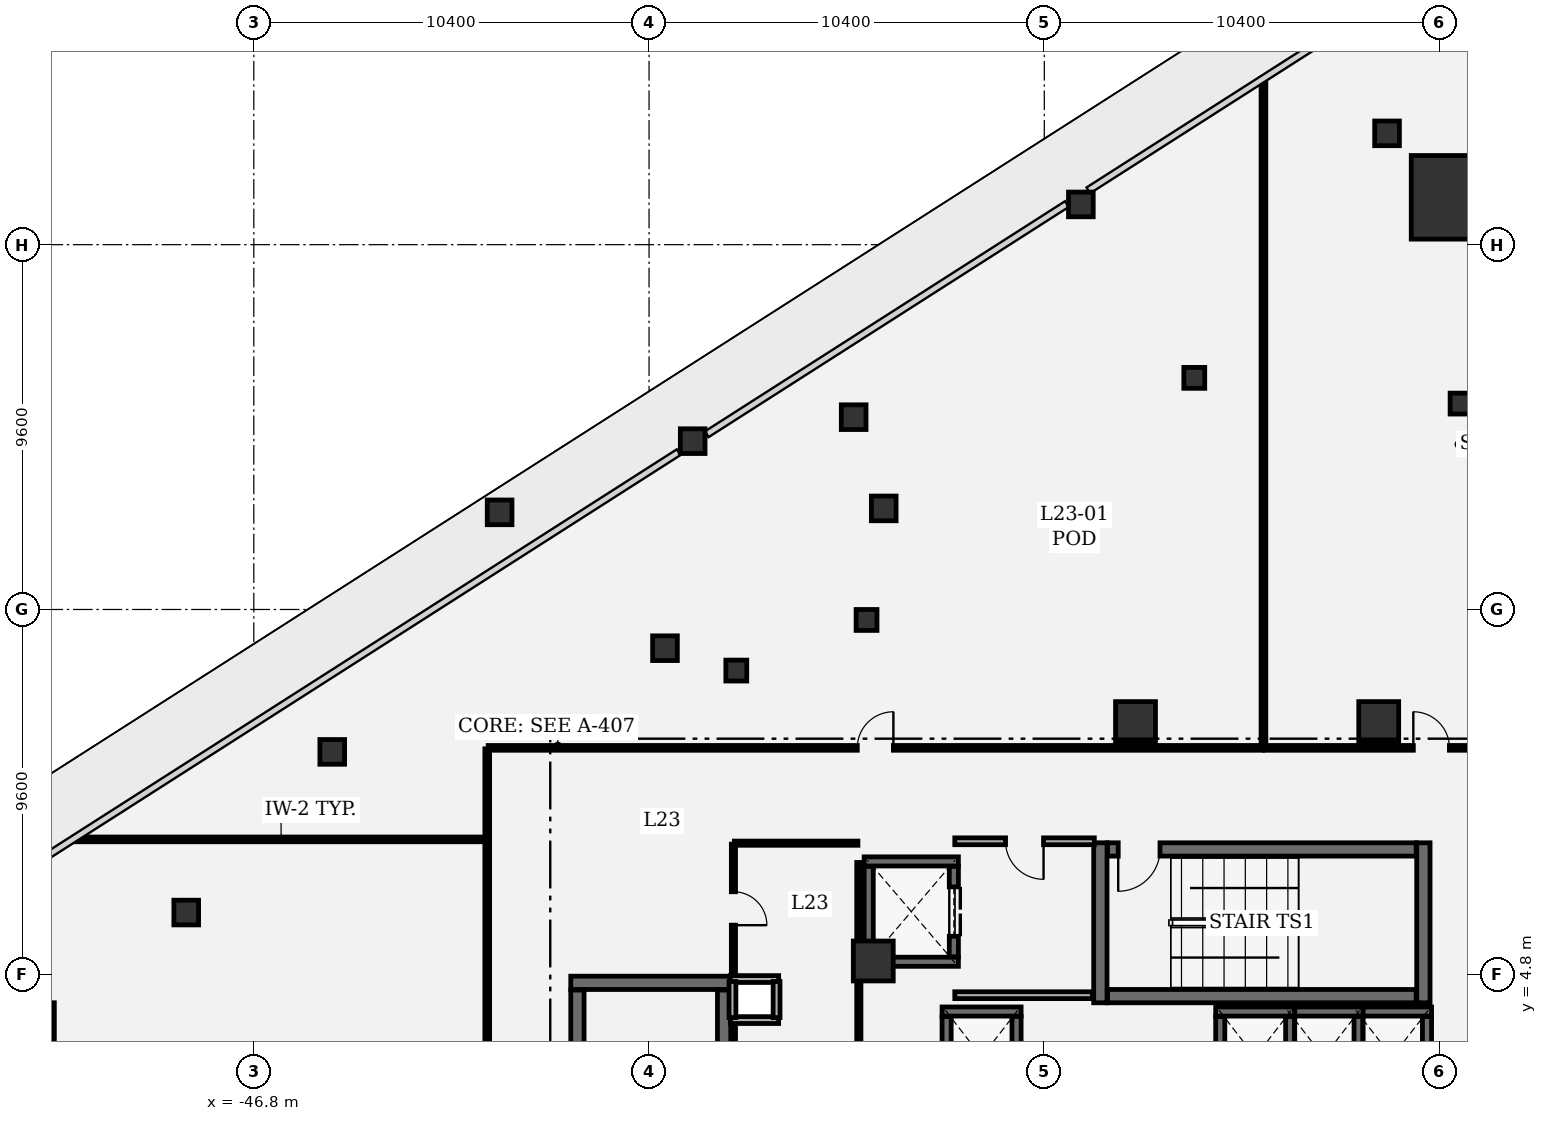
"""IFC4 building model, lengths in metres.
Left out: names, types, materials, properties, quantities, classifications, styles, units other than length and angle.
Written with IfcOpenShell. Run it as: python <this file> out.ifc"""

import sys

from ifc_helpers import new_model, si_unit, direction, frame, frame_2d, origin, origin_2d, place, context, subcontext, project, spatial, rectangle, extrude, element, fill, save


model = new_model("IFC4")
c1 = context("Model", 3, precision=1e-05, world=origin(), true_north=direction((0.0, 1.0)))
c2 = subcontext(c1, "Body", "Model", "MODEL_VIEW")
j1 = project(units=[si_unit("LENGTHUNIT", "METRE"), si_unit("PLANEANGLEUNIT", "RADIAN")], contexts=[c1])
p1 = place(None, origin())
s1 = spatial("IfcSite", under=j1, at=p1, CompositionType="ELEMENT")
p2 = place(p1, origin())
s2 = spatial("IfcBuilding", under=s1, at=p2, CompositionType="ELEMENT")
p3 = place(p2, frame((0.0, 0.0, 105.0)))
s3 = spatial("IfcBuildingStorey", under=s2, at=p3, CompositionType="ELEMENT", Elevation=105.0)
for number, where, z_axis, x_axis in (
    (1, (-53.049, 2.951, 0.0), (0.0, 0.0, 1.0), (1.0, 0.0, 0.0)),
    (2, (-15.344, 25.246, 0.0), (0.0, 0.0, 1.0), (1.0, 0.0, 0.0)),
):
    element("IfcColumn", number, at=place(p3, frame(where, z_axis=z_axis, x_axis=x_axis)), inside=s3, PredefinedType="COLUMN", context=c2, shape_type="SweptSolid", body=[
        extrude(rectangle(XDim=2.0, YDim=2.2, at=origin_2d()), origin(), (0.0, 0.0, 1.0), 4.8),
    ])
for number, where, z_axis, x_axis in (
    (3, (-23.6, 11.45, 0.0), (0.0, 0.0, 1.0), (1.0, 0.0, 0.0)),
    (4, (-17.2, 11.45, 0.0), (0.0, 0.0, 1.0), (1.0, 0.0, 0.0)),
    (5, (-30.5, 5.15, 0.0), (0.0, 0.0, 1.0), (1.0, 0.0, 0.0)),
):
    element("IfcColumn", number, at=place(p3, frame(where, z_axis=z_axis, x_axis=x_axis)), inside=s3, PredefinedType="COLUMN", context=c2, shape_type="SweptSolid", body=[
        extrude(rectangle(XDim=1.05, YDim=1.05, at=origin_2d()), origin(), (0.0, 0.0, 1.0), 4.8),
    ])
for number, where, z_axis, x_axis in (
    (6, (-40.333, 16.956, 0.0), (0.0, 0.0, 1.0), (1.0, 0.0, 0.0)),
    (7, (-35.252, 18.829, 0.0), (0.0, 0.0, 1.0), (1.0, 0.0, 0.0)),
    (8, (-25.038, 25.059, 0.0), (0.0, 0.0, 1.0), (1.0, 0.0, 0.0)),
    (9, (-31.016, 19.46, 0.0), (0.0, 0.0, 1.0), (1.0, 0.0, 0.0)),
    (10, (-44.736, 10.652, 0.0), (0.0, 0.0, 1.0), (1.0, 0.0, 0.0)),
    (11, (-48.578, 6.425, 0.0), (0.0, 0.0, 1.0), (1.0, 0.0, 0.0)),
    (12, (-16.981, 26.929, 0.0), (0.0, 0.0, 1.0), (1.0, 0.0, 0.0)),
    (13, (-35.981, 13.381, 0.0), (0.0, 0.0, 1.0), (1.0, 0.0, 0.0)),
    (14, (-30.225, 17.06, 0.0), (0.0, 0.0, 1.0), (1.0, 0.0, 0.0)),
):
    element("IfcColumn", number, at=place(p3, frame(where, z_axis=z_axis, x_axis=x_axis)), inside=s3, PredefinedType="COLUMN", context=c2, shape_type="SweptSolid", body=[
        extrude(rectangle(XDim=0.65, YDim=0.65, at=origin_2d()), origin(), (0.0, 0.0, 1.0), 4.8),
    ])
for number, where, z_axis, x_axis in (
    (15, (-34.104, 12.792, 0.0), (0.0, 0.0, 1.0), (1.0, 0.0, 0.0)),
    (16, (-22.053, 20.495, 0.0), (0.0, 0.0, 1.0), (1.0, 0.0, 0.0)),
    (17, (-30.677, 14.124, 0.0), (0.0, 0.0, 1.0), (1.0, 0.0, 0.0)),
    (18, (-15.046, 19.818, 0.0), (0.0, 0.0, 1.0), (1.0, 0.0, 0.0)),
):
    element("IfcColumn", number, at=place(p3, frame(where, z_axis=z_axis, x_axis=x_axis)), inside=s3, PredefinedType="COLUMN", context=c2, shape_type="SweptSolid", body=[
        extrude(rectangle(XDim=0.55, YDim=0.55, at=origin_2d()), origin(), (0.0, 0.0, 1.0), 4.8),
    ])
for number, where, z_axis, x_axis in (
    (19, (-24.525, 8.26, 0.0), (0.0, 0.0, 1.0), (0.0, -1.0, 0.0)),
    (20, (-16.025, 4.05, 0.0), (0.0, 0.0, 1.0), (0.0, 1.0, 0.0)),
):
    element("IfcWall", number, at=place(p3, frame(where, z_axis=z_axis, x_axis=x_axis)), inside=s3, PredefinedType="SHEAR", context=c2, shape_type="SweptSolid", body=[
        extrude(rectangle(XDim=4.21, YDim=0.35, at=frame_2d((2.105, 0.0))), origin(), (0.0, 0.0, 1.0), 4.52),
    ])
p4 = place(p3, frame((-24.335, 4.225, 0.0), z_axis=(0.0, 0.0, 1.0), x_axis=(1.0, 0.0, 0.0)))
e21 = element("IfcWall", 21, at=p4, inside=s3, PredefinedType="SHEAR", context=c2, shape_type="SweptSolid", body=[
    extrude(rectangle(XDim=8.12, YDim=0.35, at=frame_2d((4.06, 0.0))), origin(), (0.0, 0.0, 1.0), 4.52),
])
p5 = place(p3, frame((-16.215, 8.085, 0.0), z_axis=(0.0, 0.0, 1.0), x_axis=(-1.0, 0.0, 0.0)))
e22 = element("IfcWall", 22, at=p5, inside=s3, PredefinedType="SHEAR", context=c2, shape_type="SweptSolid", body=[
    extrude(rectangle(XDim=8.12, YDim=0.35, at=frame_2d((4.06, 0.0))), origin(), (0.0, 0.0, 1.0), 4.52),
])
p6 = place(p5, frame((6.74, 0.0, 0.0)))
e23 = element("IfcOpeningElement", 23, at=p6, cuts=e22, PredefinedType="OPENING", context=c2, shape_type="SweptSolid", body=[
    extrude(rectangle(XDim=1.1, YDim=2.2, at=frame_2d((0.55, 1.1))), frame((0.0, 0.185, 0.0), z_axis=(0.0, -1.0, 0.0), x_axis=(1.0, 0.0, 0.0)), (0.0, 0.0, 1.0), 0.37),
])
p7 = place(p3, frame((-34.25, 4.575, 0.0), z_axis=(0.0, 0.0, 1.0), x_axis=(-1.0, 0.0, 0.0)))
e24 = element("IfcWall", 24, at=p7, inside=s3, PredefinedType="SHEAR", context=c2, shape_type="SweptSolid", body=[
    extrude(rectangle(XDim=4.21, YDim=0.35, at=frame_2d((2.105, 0.0))), origin(), (0.0, 0.0, 1.0), 4.52),
])
for number, where, z_axis, x_axis in (
    (25, (-34.425, -4.385, 0.0), (0.0, 0.0, 1.0), (0.0, 1.0, 0.0)),
    (26, (-38.285, 4.385, 0.0), (0.0, 0.0, 1.0), (0.0, -1.0, 0.0)),
):
    element("IfcWall", number, at=place(p3, frame(where, z_axis=z_axis, x_axis=x_axis)), inside=s3, PredefinedType="SHEAR", context=c2, shape_type="SweptSolid", body=[
        extrude(rectangle(XDim=8.77, YDim=0.35, at=frame_2d((4.385, 0.0))), origin(), (0.0, 0.0, 1.0), 4.52),
    ])
for number, where, z_axis, x_axis in (
    (27, (-28.26, 5.13, 0.0), (0.0, 0.0, 1.0), (-1.0, 0.0, 0.0)),
    (28, (-30.74, 7.77, 0.0), (0.0, 0.0, 1.0), (1.0, 0.0, 0.0)),
):
    element("IfcWall", number, at=place(p3, frame(where, z_axis=z_axis, x_axis=x_axis)), inside=s3, PredefinedType="SHEAR", context=c2, shape_type="SweptSolid", body=[
        extrude(rectangle(XDim=2.48, YDim=0.24, at=frame_2d((1.24, 0.0))), origin(), (0.0, 0.0, 1.0), 4.52),
    ])
p8 = place(p3, frame((-30.62, 5.262, 0.0), z_axis=(0.0, 0.0, 1.0), x_axis=(0.0, 1.0, 0.0)))
e29 = element("IfcWall", 29, at=p8, inside=s3, PredefinedType="SHEAR", context=c2, shape_type="SweptSolid", body=[
    extrude(rectangle(XDim=2.376, YDim=0.24, at=frame_2d((1.188, 0.0))), origin(), (0.0, 0.0, 1.0), 4.52),
])
p9 = place(p3, frame((-28.38, 7.638, 0.0), z_axis=(0.0, 0.0, 1.0), x_axis=(0.0, -1.0, 0.0)))
e30 = element("IfcWall", 30, at=p9, inside=s3, PredefinedType="SHEAR", context=c2, shape_type="SweptSolid", body=[
    extrude(rectangle(XDim=2.376, YDim=0.24, at=frame_2d((1.188, 0.0))), origin(), (0.0, 0.0, 1.0), 4.52),
])
p10 = place(p9, frame((0.538, 0.0, 0.0)))
e31 = element("IfcOpeningElement", 31, at=p10, cuts=e30, PredefinedType="OPENING", context=c2, shape_type="SweptSolid", body=[
    extrude(rectangle(XDim=1.3, YDim=2.3, at=frame_2d((0.65, 1.15))), frame((0.0, 0.13, 0.0), z_axis=(0.0, -1.0, 0.0), x_axis=(1.0, 0.0, 0.0)), (0.0, 0.0, 1.0), 0.26),
])
p11 = place(p3, frame((-28.69, 3.82, 0.0), z_axis=(0.0, 0.0, 1.0), x_axis=(1.0, 0.0, 0.0)))
e32 = element("IfcWall", 32, at=p11, inside=s3, PredefinedType="SHEAR", context=c2, shape_type="SweptSolid", body=[
    extrude(rectangle(XDim=2.08, YDim=0.24, at=frame_2d((1.04, 0.0))), origin(), (0.0, 0.0, 1.0), 4.52),
])
for number, where, z_axis, x_axis in (
    (33, (-28.57, 1.562, 0.0), (0.0, 0.0, 1.0), (0.0, 1.0, 0.0)),
    (34, (-26.73, 3.688, 0.0), (0.0, 0.0, 1.0), (0.0, -1.0, 0.0)),
):
    element("IfcWall", number, at=place(p3, frame(where, z_axis=z_axis, x_axis=x_axis)), inside=s3, PredefinedType="SHEAR", context=c2, shape_type="SweptSolid", body=[
        extrude(rectangle(XDim=2.126, YDim=0.24, at=frame_2d((1.063, 0.0))), origin(), (0.0, 0.0, 1.0), 4.52),
    ])
p12 = place(p3, frame((-21.49, 3.82, 0.0), z_axis=(0.0, 0.0, 1.0), x_axis=(1.0, 0.0, 0.0)))
e35 = element("IfcWall", 35, at=p12, inside=s3, PredefinedType="SHEAR", context=c2, shape_type="SweptSolid", body=[
    extrude(rectangle(XDim=2.08, YDim=0.24, at=frame_2d((1.04, 0.0))), origin(), (0.0, 0.0, 1.0), 4.52),
])
for number, where, z_axis, x_axis in (
    (36, (-21.37, 1.562, 0.0), (0.0, 0.0, 1.0), (0.0, 1.0, 0.0)),
    (37, (-19.53, 3.688, 0.0), (0.0, 0.0, 1.0), (0.0, -1.0, 0.0)),
):
    element("IfcWall", number, at=place(p3, frame(where, z_axis=z_axis, x_axis=x_axis)), inside=s3, PredefinedType="SHEAR", context=c2, shape_type="SweptSolid", body=[
        extrude(rectangle(XDim=2.126, YDim=0.24, at=frame_2d((1.063, 0.0))), origin(), (0.0, 0.0, 1.0), 4.52),
    ])
p13 = place(p3, frame((-19.41, 3.82, 0.0), z_axis=(0.0, 0.0, 1.0), x_axis=(1.0, 0.0, 0.0)))
e38 = element("IfcWall", 38, at=p13, inside=s3, PredefinedType="SHEAR", context=c2, shape_type="SweptSolid", body=[
    extrude(rectangle(XDim=1.8, YDim=0.24, at=frame_2d((0.9, 0.0))), origin(), (0.0, 0.0, 1.0), 4.52),
])
p14 = place(p3, frame((-17.73, 3.688, 0.0), z_axis=(0.0, 0.0, 1.0), x_axis=(0.0, -1.0, 0.0)))
e39 = element("IfcWall", 39, at=p14, inside=s3, PredefinedType="SHEAR", context=c2, shape_type="SweptSolid", body=[
    extrude(rectangle(XDim=2.126, YDim=0.24, at=frame_2d((1.063, 0.0))), origin(), (0.0, 0.0, 1.0), 4.52),
])
p15 = place(p3, frame((-17.61, 3.82, 0.0), z_axis=(0.0, 0.0, 1.0), x_axis=(1.0, 0.0, 0.0)))
e40 = element("IfcWall", 40, at=p15, inside=s3, PredefinedType="SHEAR", context=c2, shape_type="SweptSolid", body=[
    extrude(rectangle(XDim=1.8, YDim=0.24, at=frame_2d((0.9, 0.0))), origin(), (0.0, 0.0, 1.0), 4.52),
])
p16 = place(p3, frame((-15.93, 3.688, 0.0), z_axis=(0.0, 0.0, 1.0), x_axis=(0.0, -1.0, 0.0)))
e41 = element("IfcWall", 41, at=p16, inside=s3, PredefinedType="SHEAR", context=c2, shape_type="SweptSolid", body=[
    extrude(rectangle(XDim=2.126, YDim=0.24, at=frame_2d((1.063, 0.0))), origin(), (0.0, 0.0, 1.0), 4.52),
])
for number, where, z_axis, x_axis in (
    (42, (-32.99, 3.595, 0.0), (0.0, 0.0, 1.0), (-1.0, 0.0, 0.0)),
    (43, (-34.26, 4.675, 0.0), (0.0, 0.0, 1.0), (1.0, 0.0, 0.0)),
):
    element("IfcWall", number, at=place(p3, frame(where, z_axis=z_axis, x_axis=x_axis)), inside=s3, PredefinedType="PARTITIONING", context=c2, shape_type="SweptSolid", body=[
        extrude(rectangle(XDim=1.27, YDim=0.18, at=frame_2d((0.635, 0.0))), origin(), (0.0, 0.0, 1.0), 4.52),
    ])
for number, where, z_axis, x_axis in (
    (44, (-34.205, 3.66, 0.0), (0.0, 0.0, 1.0), (0.0, 1.0, 0.0)),
    (45, (-33.045, 4.61, 0.0), (0.0, 0.0, 1.0), (0.0, -1.0, 0.0)),
):
    element("IfcWall", number, at=place(p3, frame(where, z_axis=z_axis, x_axis=x_axis)), inside=s3, PredefinedType="PARTITIONING", context=c2, shape_type="SweptSolid", body=[
        extrude(rectangle(XDim=0.95, YDim=0.18, at=frame_2d((0.475, 0.0))), origin(), (0.0, 0.0, 1.0), 4.52),
    ])
p17 = place(p3, frame((-28.355, 4.25, 0.0), z_axis=(0.0, 0.0, 1.0), x_axis=(1.0, 0.0, 0.0)))
e46 = element("IfcWall", 46, at=p17, inside=s3, PredefinedType="PARTITIONING", context=c2, shape_type="SweptSolid", body=[
    extrude(rectangle(XDim=3.622, YDim=0.18, at=frame_2d((1.811, 0.0))), origin(), (0.0, 0.0, 1.0), 4.52),
])
p18 = place(p3, frame((-24.684, 8.3, 0.0), z_axis=(0.0, 0.0, 1.0), x_axis=(-1.0, 0.0, 0.0)))
e47 = element("IfcWall", 47, at=p18, inside=s3, PredefinedType="PARTITIONING", context=c2, shape_type="SweptSolid", body=[
    extrude(rectangle(XDim=3.671, YDim=0.18, at=frame_2d((1.835, 0.0))), origin(), (0.0, 0.0, 1.0), 4.52),
])
p19 = place(p18, frame((1.335, 0.0, 0.0)))
e48 = element("IfcOpeningElement", 48, at=p19, cuts=e47, PredefinedType="OPENING", context=c2, shape_type="SweptSolid", body=[
    extrude(rectangle(XDim=1.0, YDim=2.15, at=frame_2d((0.5, 1.075))), frame((0.0, 0.1, 0.0), z_axis=(0.0, -1.0, 0.0), x_axis=(1.0, 0.0, 0.0)), (0.0, 0.0, 1.0), 0.2),
])
p20 = place(p3, frame((-30.88, 1.625, 0.0), z_axis=(0.0, 0.0, 1.0), x_axis=(0.0, 1.0, 0.0)))
e49 = element("IfcWall", 49, at=p20, inside=s3, PredefinedType="PARTITIONING", context=c2, shape_type="SweptSolid", body=[
    extrude(rectangle(XDim=2.935, YDim=0.11, at=frame_2d((1.468, 0.0))), origin(), (0.0, 0.0, 1.0), 4.52),
])
p21 = place(p3, frame((-30.88, 5.74, 0.0), z_axis=(0.0, 0.0, 1.0), x_axis=(0.0, 1.0, 0.0)))
e50 = element("IfcWall", 50, at=p21, inside=s3, PredefinedType="PARTITIONING", context=c2, shape_type="SweptSolid", body=[
    extrude(rectangle(XDim=2.003, YDim=0.11, at=frame_2d((1.001, 0.0))), origin(), (0.0, 0.0, 1.0), 4.52),
])
p22 = place(p3, frame((-30.905, 8.25, 0.0), z_axis=(0.0, 0.0, 1.0), x_axis=(-1.0, 0.0, 0.0)))
e51 = element("IfcWall", 51, at=p22, inside=s3, PredefinedType="PARTITIONING", context=c2, shape_type="SweptSolid", body=[
    extrude(rectangle(XDim=3.25, YDim=0.11, at=frame_2d((1.625, 0.0))), origin(), (0.0, 0.0, 1.0), 4.52),
])
p23 = place(p3, frame((-34.18, 8.225, 0.0), z_axis=(0.0, 0.0, 1.0), x_axis=(0.0, -1.0, 0.0)))
e52 = element("IfcWall", 52, at=p23, inside=s3, PredefinedType="PARTITIONING", context=c2, shape_type="SweptSolid", body=[
    extrude(rectangle(XDim=3.385, YDim=0.11, at=frame_2d((1.692, 0.0))), origin(), (0.0, 0.0, 1.0), 4.52),
])
p24 = place(p23, frame((1.252, 0.0, 0.0)))
e53 = element("IfcOpeningElement", 53, at=p24, cuts=e52, PredefinedType="OPENING", context=c2, shape_type="SweptSolid", body=[
    extrude(rectangle(XDim=0.88, YDim=2.1, at=frame_2d((0.44, 1.05))), frame((0.0, 0.065, 0.0), z_axis=(0.0, -1.0, 0.0), x_axis=(1.0, 0.0, 0.0)), (0.0, 0.0, 1.0), 0.13),
])
p25 = place(p3, frame((-34.18, 3.43, 0.0), z_axis=(0.0, 0.0, 1.0), x_axis=(0.0, -1.0, 0.0)))
e54 = element("IfcWall", 54, at=p25, inside=s3, PredefinedType="PARTITIONING", context=c2, shape_type="SweptSolid", body=[
    extrude(rectangle(XDim=1.805, YDim=0.11, at=frame_2d((0.902, 0.0))), origin(), (0.0, 0.0, 1.0), 4.52),
])
p26 = place(p3, frame((-51.482, 8.35, 0.0), z_axis=(0.0, 0.0, 1.0), x_axis=(1.0, 0.0, 0.0)))
e55 = element("IfcWall", 55, at=p26, inside=s3, PredefinedType="PARTITIONING", context=c2, shape_type="SweptSolid", body=[
    extrude(rectangle(XDim=10.799, YDim=0.125, at=frame_2d((5.4, 0.0))), origin(), (0.0, 0.0, 1.0), 3.64),
])
p27 = place(p3, frame((-40.658, 10.733, 0.0), z_axis=(0.0, 0.0, 1.0), x_axis=(0.0, -1.0, 0.0)))
e56 = element("IfcWall", 56, at=p27, inside=s3, PredefinedType="PARTITIONING", context=c2, shape_type="SweptSolid", body=[
    extrude(rectangle(XDim=2.358, YDim=0.125, at=frame_2d((1.179, 0.0))), origin(), (0.0, 0.0, 1.0), 4.52),
])
p28 = place(p3, frame((-40.633, 10.758, 0.0), z_axis=(0.0, 0.0, 1.0), x_axis=(1.0, 0.0, 0.0)))
e57 = element("IfcWall", 57, at=p28, inside=s3, PredefinedType="PARTITIONING", context=c2, shape_type="SweptSolid", body=[
    extrude(rectangle(XDim=20.375, YDim=0.125, at=frame_2d((10.188, 0.0))), origin(), (0.0, 0.0, 1.0), 3.64),
])
p29 = place(p28, frame((9.712, 0.0, 0.0)))
e58 = element("IfcOpeningElement", 58, at=p29, cuts=e57, PredefinedType="OPENING", context=c2, shape_type="SweptSolid", body=[
    extrude(rectangle(XDim=0.95, YDim=2.15, at=frame_2d((0.475, 1.075))), frame((0.0, 0.073, 0.0), z_axis=(0.0, -1.0, 0.0), x_axis=(1.0, 0.0, 0.0)), (0.0, 0.0, 1.0), 0.145),
])
p30 = place(p3, frame((-20.233, 10.783, 0.0), z_axis=(0.0, 0.0, 1.0), x_axis=(0.0, 1.0, 0.0)))
e59 = element("IfcWall", 59, at=p30, inside=s3, PredefinedType="PARTITIONING", context=c2, shape_type="SweptSolid", body=[
    extrude(rectangle(XDim=17.51, YDim=0.125, at=frame_2d((8.755, 0.0))), origin(), (0.0, 0.0, 1.0), 3.635),
])
p31 = place(p3, frame((-20.2, 10.758, 0.0), z_axis=(0.0, 0.0, 1.0), x_axis=(1.0, 0.0, 0.0)))
e60 = element("IfcWall", 60, at=p31, inside=s3, PredefinedType="PARTITIONING", context=c2, shape_type="SweptSolid", body=[
    extrude(rectangle(XDim=7.033, YDim=0.125, at=frame_2d((3.517, 0.0))), origin(), (0.0, 0.0, 1.0), 3.635),
])
p32 = place(p31, frame((3.911, 0.0, 0.0)))
e61 = element("IfcOpeningElement", 61, at=p32, cuts=e60, PredefinedType="OPENING", context=c2, shape_type="SweptSolid", body=[
    extrude(rectangle(XDim=0.95, YDim=2.15, at=frame_2d((0.475, 1.075))), frame((0.0, 0.073, 0.0), z_axis=(0.0, -1.0, 0.0), x_axis=(1.0, 0.0, 0.0)), (0.0, 0.0, 1.0), 0.145),
])
p33 = place(p3, frame((-40.658, -8.517, 0.0), z_axis=(0.0, 0.0, 1.0), x_axis=(0.0, 1.0, 0.0)))
e62 = element("IfcWall", 62, at=p33, inside=s3, PredefinedType="PARTITIONING", context=c2, shape_type="SweptSolid", body=[
    extrude(rectangle(XDim=16.834, YDim=0.125, at=frame_2d((8.417, 0.0))), origin(), (0.0, 0.0, 1.0), 4.52),
])
p34 = place(p33, frame((7.942, 0.0, 0.0)))
e63 = element("IfcOpeningElement", 63, at=p34, cuts=e62, PredefinedType="OPENING", context=c2, shape_type="SweptSolid", body=[
    extrude(rectangle(XDim=0.95, YDim=2.15, at=frame_2d((0.475, 1.075))), frame((0.0, 0.073, 0.0), z_axis=(0.0, -1.0, 0.0), x_axis=(1.0, 0.0, 0.0)), (0.0, 0.0, 1.0), 0.145),
])
p35 = place(p6, origin())
e64 = element("IfcDoor", 64, at=p35, inside=s3, OperationType="SINGLE_SWING_RIGHT", PredefinedType="DOOR", context=c2, shape_type="SweptSolid", body=[
    extrude(rectangle(XDim=1.1, YDim=2.2, at=frame_2d((0.55, 1.1))), frame((0.0, 0.025, 0.0), z_axis=(0.0, -1.0, 0.0), x_axis=(1.0, 0.0, 0.0)), (0.0, 0.0, 1.0), 0.05),
])
fill(e23, e64)
p36 = place(p10, origin())
e65 = element("IfcDoor", 65, at=p36, inside=s3, OperationType="DOUBLE_DOOR_SLIDING", PredefinedType="DOOR", context=c2, shape_type="SweptSolid", body=[
    extrude(rectangle(XDim=1.3, YDim=2.3, at=frame_2d((0.65, 1.15))), frame((0.0, 0.025, 0.0), z_axis=(0.0, -1.0, 0.0), x_axis=(1.0, 0.0, 0.0)), (0.0, 0.0, 1.0), 0.05),
])
fill(e31, e65)
p37 = place(p24, origin())
e66 = element("IfcDoor", 66, at=p37, inside=s3, OperationType="SINGLE_SWING_RIGHT", PredefinedType="DOOR", context=c2, shape_type="SweptSolid", body=[
    extrude(rectangle(XDim=0.88, YDim=2.1, at=frame_2d((0.44, 1.05))), frame((0.0, 0.025, 0.0), z_axis=(0.0, -1.0, 0.0), x_axis=(1.0, 0.0, 0.0)), (0.0, 0.0, 1.0), 0.05),
])
fill(e53, e66)
p38 = place(p29, origin())
e67 = element("IfcDoor", 67, at=p38, inside=s3, OperationType="SINGLE_SWING_RIGHT", PredefinedType="DOOR", context=c2, shape_type="SweptSolid", body=[
    extrude(rectangle(XDim=0.95, YDim=2.15, at=frame_2d((0.475, 1.075))), frame((0.0, 0.025, 0.0), z_axis=(0.0, -1.0, 0.0), x_axis=(1.0, 0.0, 0.0)), (0.0, 0.0, 1.0), 0.05),
])
fill(e58, e67)
p39 = place(p32, origin())
e68 = element("IfcDoor", 68, at=p39, inside=s3, OperationType="SINGLE_SWING_LEFT", PredefinedType="DOOR", context=c2, shape_type="SweptSolid", body=[
    extrude(rectangle(XDim=0.95, YDim=2.15, at=frame_2d((0.475, 1.075))), frame((0.0, 0.025, 0.0), z_axis=(0.0, -1.0, 0.0), x_axis=(1.0, 0.0, 0.0)), (0.0, 0.0, 1.0), 0.05),
])
fill(e61, e68)
p40 = place(p19, origin())
e69 = element("IfcDoor", 69, at=p40, inside=s3, OperationType="SINGLE_SWING_LEFT", PredefinedType="DOOR", context=c2, shape_type="SweptSolid", body=[
    extrude(rectangle(XDim=1.0, YDim=2.15, at=frame_2d((0.5, 1.075))), frame((0.0, 0.025, 0.0), z_axis=(0.0, -1.0, 0.0), x_axis=(1.0, 0.0, 0.0)), (0.0, 0.0, 1.0), 0.05),
])
fill(e48, e69)
save(model, sys.argv[1])
